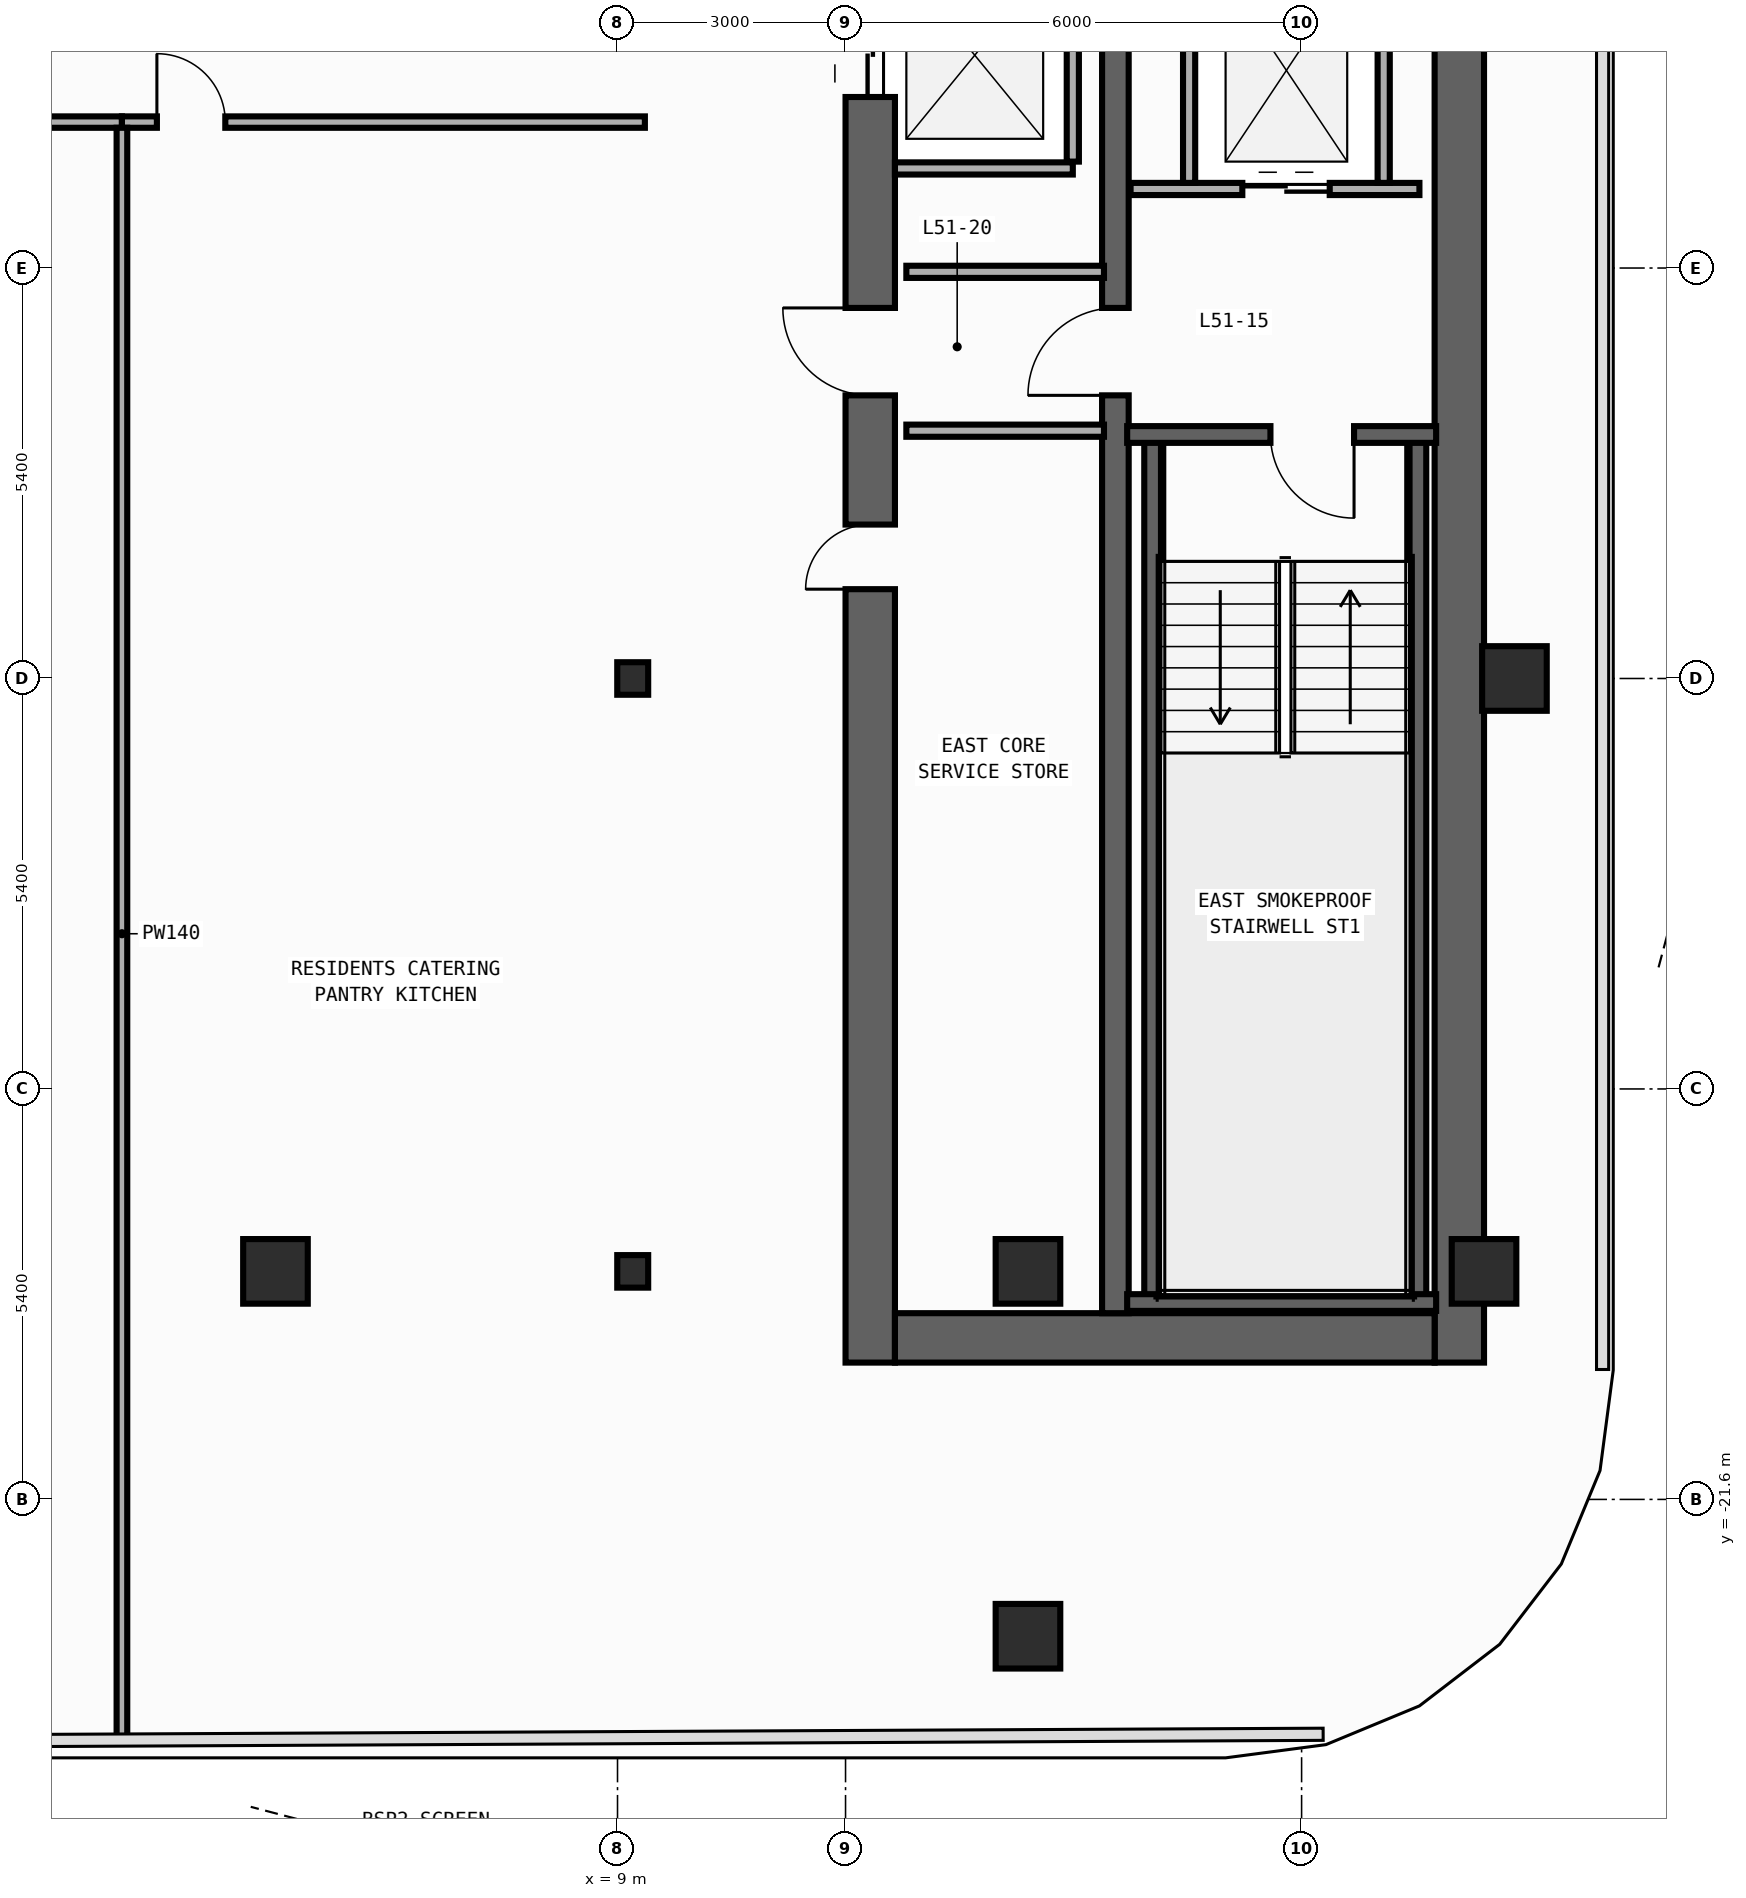
"""IFC4 building model, lengths in metres.
Left out: names, types, materials, properties, quantities, classifications, styles, units other than length and angle.
Written with IfcOpenShell. Run it as: python <this file> out.ifc"""

import sys

from ifc_helpers import new_model, si_unit, direction, frame, frame_2d, origin, origin_2d, place, context, subcontext, project, spatial, rectangle, i_section, extrude, element, fill, save


model = new_model("IFC4")
c1 = context("Model", 3, precision=1e-05, world=origin(), true_north=direction((0.0, 1.0)))
c2 = subcontext(c1, "Body", "Model", "MODEL_VIEW")
j1 = project(units=[si_unit("LENGTHUNIT", "METRE"), si_unit("PLANEANGLEUNIT", "RADIAN")], contexts=[c1])
p1 = place(None, origin())
s1 = spatial("IfcSite", under=j1, at=p1, CompositionType="ELEMENT")
p2 = place(p1, origin())
s2 = spatial("IfcBuilding", under=s1, at=p2, CompositionType="ELEMENT")
p3 = place(p2, frame((0.0, 0.0, 222.4)))
s3 = spatial("IfcBuildingStorey", under=s2, at=p3, CompositionType="ELEMENT", Elevation=222.4)
p4 = place(p3, frame((12.325, -19.8, 0.0), z_axis=(0.0, 0.0, 1.0), x_axis=(0.0, 1.0, 0.0)))
e1 = element("IfcWall", 1, at=p4, inside=s3, PredefinedType="SHEAR", context=c2, shape_type="SweptSolid", body=[
    extrude(rectangle(XDim=27.0, YDim=0.65, at=frame_2d((13.5, 0.0))), origin(), (0.0, 0.0, 1.0), 3.34),
])
p5 = place(p4, frame((23.05, 0.0, 0.0)))
e2 = element("IfcOpeningElement", 2, at=p5, cuts=e1, PredefinedType="OPENING", context=c2, shape_type="SweptSolid", body=[
    extrude(rectangle(XDim=1.1, YDim=2.2, at=frame_2d((0.55, 1.1))), frame((0.0, 0.335, 0.0), z_axis=(0.0, -1.0, 0.0), x_axis=(1.0, 0.0, 0.0)), (0.0, 0.0, 1.0), 0.67),
])
p6 = place(p4, frame((19.85, 0.0, 0.0)))
e3 = element("IfcOpeningElement", 3, at=p6, cuts=e1, PredefinedType="OPENING", context=c2, shape_type="SweptSolid", body=[
    extrude(rectangle(XDim=1.1, YDim=2.2, at=frame_2d((0.55, 1.1))), frame((0.0, 0.335, 0.0), z_axis=(0.0, -1.0, 0.0), x_axis=(1.0, 0.0, 0.0)), (0.0, 0.0, 1.0), 0.67),
])
p7 = place(p4, frame((16.65, 0.0, 0.0)))
e4 = element("IfcOpeningElement", 4, at=p7, cuts=e1, PredefinedType="OPENING", context=c2, shape_type="SweptSolid", body=[
    extrude(rectangle(XDim=1.1, YDim=2.2, at=frame_2d((0.55, 1.1))), frame((0.0, 0.335, 0.0), z_axis=(0.0, -1.0, 0.0), x_axis=(1.0, 0.0, 0.0)), (0.0, 0.0, 1.0), 0.67),
])
p8 = place(p4, frame((10.175, 0.0, 0.0)))
e5 = element("IfcOpeningElement", 5, at=p8, cuts=e1, PredefinedType="OPENING", context=c2, shape_type="SweptSolid", body=[
    extrude(rectangle(XDim=0.85, YDim=2.1, at=frame_2d((0.425, 1.05))), frame((0.0, 0.335, 0.0), z_axis=(0.0, -1.0, 0.0), x_axis=(1.0, 0.0, 0.0)), (0.0, 0.0, 1.0), 0.67),
])
p9 = place(p4, frame((12.725, 0.0, 0.0)))
e6 = element("IfcOpeningElement", 6, at=p9, cuts=e1, PredefinedType="OPENING", context=c2, shape_type="SweptSolid", body=[
    extrude(rectangle(XDim=1.15, YDim=2.2, at=frame_2d((0.575, 1.1))), frame((0.0, 0.335, 0.0), z_axis=(0.0, -1.0, 0.0), x_axis=(1.0, 0.0, 0.0)), (0.0, 0.0, 1.0), 0.67),
])
p10 = place(p4, frame((25.125, 0.0, 0.0)))
e7 = element("IfcOpeningElement", 7, at=p10, cuts=e1, PredefinedType="OPENING", context=c2, shape_type="SweptSolid", body=[
    extrude(rectangle(XDim=0.85, YDim=2.1, at=frame_2d((0.425, 1.05))), frame((0.0, 0.335, 0.0), z_axis=(0.0, -1.0, 0.0), x_axis=(1.0, 0.0, 0.0)), (0.0, 0.0, 1.0), 0.67),
])
p11 = place(p3, frame((20.075, -19.8, 0.0), z_axis=(0.0, 0.0, 1.0), x_axis=(0.0, 1.0, 0.0)))
e8 = element("IfcWall", 8, at=p11, inside=s3, PredefinedType="SHEAR", context=c2, shape_type="SweptSolid", body=[
    extrude(rectangle(XDim=27.0, YDim=0.65, at=frame_2d((13.5, 0.0))), origin(), (0.0, 0.0, 1.0), 3.34),
])
p12 = place(p3, frame((12.65, -19.475, 0.0), z_axis=(0.0, 0.0, 1.0), x_axis=(1.0, 0.0, 0.0)))
e9 = element("IfcWall", 9, at=p12, inside=s3, PredefinedType="SHEAR", context=c2, shape_type="SweptSolid", body=[
    extrude(rectangle(XDim=7.1, YDim=0.65, at=frame_2d((3.55, 0.0))), origin(), (0.0, 0.0, 1.0), 3.34),
])
p13 = place(p3, frame((15.55, -19.15, 0.0), z_axis=(0.0, 0.0, 1.0), x_axis=(0.0, 1.0, 0.0)))
e10 = element("IfcWall", 10, at=p13, inside=s3, PredefinedType="SHEAR", context=c2, shape_type="SweptSolid", body=[
    extrude(rectangle(XDim=25.7, YDim=0.35, at=frame_2d((12.85, 0.0))), origin(), (0.0, 0.0, 1.0), 3.34),
])
p14 = place(p13, frame((12.075, 0.0, 0.0)))
e11 = element("IfcOpeningElement", 11, at=p14, cuts=e10, PredefinedType="OPENING", context=c2, shape_type="SweptSolid", body=[
    extrude(rectangle(XDim=1.15, YDim=2.2, at=frame_2d((0.575, 1.1))), frame((0.0, 0.185, 0.0), z_axis=(0.0, -1.0, 0.0), x_axis=(1.0, 0.0, 0.0)), (0.0, 0.0, 1.0), 0.37),
])
p15 = place(p13, frame((24.475, 0.0, 0.0)))
e12 = element("IfcOpeningElement", 12, at=p15, cuts=e10, PredefinedType="OPENING", context=c2, shape_type="SweptSolid", body=[
    extrude(rectangle(XDim=0.85, YDim=2.1, at=frame_2d((0.425, 1.05))), frame((0.0, 0.185, 0.0), z_axis=(0.0, -1.0, 0.0), x_axis=(1.0, 0.0, 0.0)), (0.0, 0.0, 1.0), 0.37),
])
for number, where, z_axis, x_axis in (
    (13, (16.04, -19.01, 0.0), (0.0, 0.0, 1.0), (0.0, 1.0, 0.0)),
    (14, (19.53, -19.01, 0.0), (0.0, 0.0, 1.0), (0.0, 1.0, 0.0)),
):
    element("IfcWall", number, at=place(p3, frame(where, z_axis=z_axis, x_axis=x_axis)), inside=s3, PredefinedType="SHEAR", context=c2, shape_type="SweptSolid", body=[
        extrude(rectangle(XDim=11.42, YDim=0.22, at=frame_2d((5.71, 0.0))), origin(), (0.0, 0.0, 1.0), 3.34),
    ])
p16 = place(p3, frame((15.705, -19.01, 0.0), z_axis=(0.0, 0.0, 1.0), x_axis=(1.0, 0.0, 0.0)))
e15 = element("IfcWall", 15, at=p16, inside=s3, PredefinedType="SHEAR", context=c2, shape_type="SweptSolid", body=[
    extrude(rectangle(XDim=4.065, YDim=0.22, at=frame_2d((2.032, 0.0))), origin(), (0.0, 0.0, 1.0), 3.34),
])
p17 = place(p3, frame((19.77, -7.59, 0.0), z_axis=(0.0, 0.0, 1.0), x_axis=(-1.0, 0.0, 0.0)))
e16 = element("IfcWall", 16, at=p17, inside=s3, PredefinedType="SHEAR", context=c2, shape_type="SweptSolid", body=[
    extrude(rectangle(XDim=4.065, YDim=0.22, at=frame_2d((2.032, 0.0))), origin(), (0.0, 0.0, 1.0), 3.34),
])
p18 = place(p17, frame((1.08, 0.0, 0.0)))
e17 = element("IfcOpeningElement", 17, at=p18, cuts=e16, PredefinedType="OPENING", context=c2, shape_type="SweptSolid", body=[
    extrude(rectangle(XDim=1.1, YDim=2.2, at=frame_2d((0.55, 1.1))), frame((0.0, 0.12, 0.0), z_axis=(0.0, -1.0, 0.0), x_axis=(1.0, 0.0, 0.0)), (0.0, 0.0, 1.0), 0.24),
])
for number, where, z_axis, x_axis in (
    (18, (9.2, -18.6, 0.0), (0.0, 0.0, 1.0), (1.0, 0.0, 0.0)),
    (19, (9.2, -10.8, 0.0), (0.0, 0.0, 1.0), (1.0, 0.0, 0.0)),
):
    element("IfcColumn", number, at=place(p3, frame(where, z_axis=z_axis, x_axis=x_axis)), inside=s3, PredefinedType="COLUMN", context=c2, shape_type="SweptSolid", body=[
        extrude(i_section(OverallWidth=0.407, OverallDepth=0.428, WebThickness=0.02, FlangeThickness=0.035, FilletRadius=0.022, at=origin_2d()), origin(), (0.0, 0.0, 1.0), 3.6),
    ])
for number, where, z_axis, x_axis in (
    (20, (20.4, -18.6, 0.0), (0.0, 0.0, 1.0), (1.0, 0.0, 0.0)),
    (21, (14.4, -18.6, 0.0), (0.0, 0.0, 1.0), (1.0, 0.0, 0.0)),
    (22, (4.5, -18.6, 0.0), (0.0, 0.0, 1.0), (1.0, 0.0, 0.0)),
    (23, (20.8, -10.8, 0.0), (0.0, 0.0, 1.0), (1.0, 0.0, 0.0)),
    (24, (14.4, -23.4, 0.0), (0.0, 0.0, 1.0), (1.0, 0.0, 0.0)),
):
    element("IfcColumn", number, at=place(p3, frame(where, z_axis=z_axis, x_axis=x_axis)), inside=s3, PredefinedType="COLUMN", context=c2, shape_type="SweptSolid", body=[
        extrude(rectangle(XDim=0.85, YDim=0.85, at=origin_2d()), origin(), (0.0, 0.0, 1.0), 3.6),
    ])
p19 = place(p3, frame((12.65, -4.09, 0.0), z_axis=(0.0, 0.0, 1.0), x_axis=(1.0, 0.0, 0.0)))
e25 = element("IfcWall", 25, at=p19, inside=s3, PredefinedType="STANDARD", context=c2, shape_type="SweptSolid", body=[
    extrude(rectangle(XDim=2.34, YDim=0.16, at=frame_2d((1.17, 0.0))), origin(), (0.0, 0.0, 1.0), 3.34),
])
p20 = place(p3, frame((14.99, -4.0, 0.0), z_axis=(0.0, 0.0, 1.0), x_axis=(0.0, 1.0, 0.0)))
e26 = element("IfcWall", 26, at=p20, inside=s3, PredefinedType="STANDARD", context=c2, shape_type="SweptSolid", body=[
    extrude(rectangle(XDim=2.8, YDim=0.16, at=frame_2d((1.4, 0.0))), origin(), (0.0, 0.0, 1.0), 3.34),
])
p21 = place(p3, frame((15.75, -4.36, 0.0), z_axis=(0.0, 0.0, 1.0), x_axis=(1.0, 0.0, 0.0)))
e27 = element("IfcWall", 27, at=p21, inside=s3, PredefinedType="STANDARD", context=c2, shape_type="SweptSolid", body=[
    extrude(rectangle(XDim=3.8, YDim=0.16, at=frame_2d((1.9, 0.0))), origin(), (0.0, 0.0, 1.0), 3.34),
])
p22 = place(p21, frame((1.47, 0.0, 0.0)))
e28 = element("IfcOpeningElement", 28, at=p22, cuts=e27, PredefinedType="OPENING", context=c2, shape_type="SweptSolid", body=[
    extrude(rectangle(XDim=1.15, YDim=2.2, at=frame_2d((0.575, 1.1))), frame((0.0, 0.09, 0.0), z_axis=(0.0, -1.0, 0.0), x_axis=(1.0, 0.0, 0.0)), (0.0, 0.0, 1.0), 0.18),
])
for number, where, z_axis, x_axis in (
    (29, (16.52, -4.28, 0.0), (0.0, 0.0, 1.0), (0.0, 1.0, 0.0)),
    (30, (19.08, -4.28, 0.0), (0.0, 0.0, 1.0), (0.0, 1.0, 0.0)),
):
    element("IfcWall", number, at=place(p3, frame(where, z_axis=z_axis, x_axis=x_axis)), inside=s3, PredefinedType="STANDARD", context=c2, shape_type="SweptSolid", body=[
        extrude(rectangle(XDim=2.98, YDim=0.16, at=frame_2d((1.49, 0.0))), origin(), (0.0, 0.0, 1.0), 3.34),
    ])
for number, where, z_axis, x_axis in (
    (31, (12.8, -5.45, 0.0), (0.0, 0.0, 1.0), (1.0, 0.0, 0.0)),
    (32, (12.8, -7.54, 0.0), (0.0, 0.0, 1.0), (1.0, 0.0, 0.0)),
):
    element("IfcWall", number, at=place(p3, frame(where, z_axis=z_axis, x_axis=x_axis)), inside=s3, PredefinedType="STANDARD", context=c2, shape_type="SweptSolid", body=[
        extrude(rectangle(XDim=2.6, YDim=0.16, at=frame_2d((1.3, 0.0))), origin(), (0.0, 0.0, 1.0), 3.34),
    ])
p23 = place(p3, frame((-9.36, -3.48, 0.0), z_axis=(0.0, 0.0, 1.0), x_axis=(1.0, 0.0, 0.0)))
e33 = element("IfcWall", 33, at=p23, inside=s3, PredefinedType="PARTITIONING", context=c2, shape_type="SweptSolid", body=[
    extrude(rectangle(XDim=11.84, YDim=0.15, at=frame_2d((5.92, 0.0))), origin(), (0.0, 0.0, 1.0), 3.34),
])
p24 = place(p23, frame((8.877, 0.0, 0.0)))
e34 = element("IfcOpeningElement", 34, at=p24, cuts=e33, PredefinedType="OPENING", context=c2, shape_type="SweptSolid", body=[
    extrude(rectangle(XDim=0.9, YDim=2.15, at=frame_2d((0.45, 1.075))), frame((0.0, 0.085, 0.0), z_axis=(0.0, -1.0, 0.0), x_axis=(1.0, 0.0, 0.0)), (0.0, 0.0, 1.0), 0.17),
])
p25 = place(p3, frame((2.48, -3.48, 0.0), z_axis=(0.0, 0.0, 1.0), x_axis=(1.0, 0.0, 0.0)))
e35 = element("IfcWall", 35, at=p25, inside=s3, PredefinedType="PARTITIONING", context=c2, shape_type="SweptSolid", body=[
    extrude(rectangle(XDim=6.88, YDim=0.15, at=frame_2d((3.44, 0.0))), origin(), (0.0, 0.0, 1.0), 3.34),
])
p26 = place(p25, frame((0.46, 0.0, 0.0)))
e36 = element("IfcOpeningElement", 36, at=p26, cuts=e35, PredefinedType="OPENING", context=c2, shape_type="SweptSolid", body=[
    extrude(rectangle(XDim=0.9, YDim=2.15, at=frame_2d((0.45, 1.075))), frame((0.0, 0.085, 0.0), z_axis=(0.0, -1.0, 0.0), x_axis=(1.0, 0.0, 0.0)), (0.0, 0.0, 1.0), 0.17),
])
p27 = place(p3, frame((2.48, -24.761, 0.0), z_axis=(0.0, 0.0, 1.0), x_axis=(0.0, 1.0, 0.0)))
e37 = element("IfcWall", 37, at=p27, inside=s3, PredefinedType="PARTITIONING", context=c2, shape_type="SweptSolid", body=[
    extrude(rectangle(XDim=21.206, YDim=0.14, at=frame_2d((10.603, 0.0))), origin(), (0.0, 0.0, 1.0), 3.34),
])
p28 = place(p18, origin())
e38 = element("IfcDoor", 38, at=p28, inside=s3, OperationType="SINGLE_SWING_LEFT", PredefinedType="DOOR", context=c2, shape_type="SweptSolid", body=[
    extrude(rectangle(XDim=1.1, YDim=2.2, at=frame_2d((0.55, 1.1))), frame((0.0, 0.025, 0.0), z_axis=(0.0, -1.0, 0.0), x_axis=(1.0, 0.0, 0.0)), (0.0, 0.0, 1.0), 0.05),
])
fill(e17, e38)
p29 = place(p7, origin())
e39 = element("IfcDoor", 39, at=p29, inside=s3, OperationType="DOUBLE_DOOR_SLIDING", PredefinedType="DOOR", context=c2, shape_type="SweptSolid", body=[
    extrude(rectangle(XDim=1.1, YDim=2.2, at=frame_2d((0.55, 1.1))), frame((0.0, 0.025, 0.0), z_axis=(0.0, -1.0, 0.0), x_axis=(1.0, 0.0, 0.0)), (0.0, 0.0, 1.0), 0.05),
])
fill(e4, e39)
p30 = place(p8, origin())
e40 = element("IfcDoor", 40, at=p30, inside=s3, OperationType="SINGLE_SWING_LEFT", PredefinedType="DOOR", context=c2, shape_type="SweptSolid", body=[
    extrude(rectangle(XDim=0.85, YDim=2.1, at=frame_2d((0.425, 1.05))), frame((0.0, 0.025, 0.0), z_axis=(0.0, -1.0, 0.0), x_axis=(1.0, 0.0, 0.0)), (0.0, 0.0, 1.0), 0.05),
])
fill(e5, e40)
p31 = place(p9, origin())
e41 = element("IfcDoor", 41, at=p31, inside=s3, OperationType="SINGLE_SWING_RIGHT", PredefinedType="DOOR", context=c2, shape_type="SweptSolid", body=[
    extrude(rectangle(XDim=1.15, YDim=2.2, at=frame_2d((0.575, 1.1))), frame((0.0, 0.025, 0.0), z_axis=(0.0, -1.0, 0.0), x_axis=(1.0, 0.0, 0.0)), (0.0, 0.0, 1.0), 0.05),
])
fill(e6, e41)
p32 = place(p14, origin())
e42 = element("IfcDoor", 42, at=p32, inside=s3, OperationType="SINGLE_SWING_LEFT", PredefinedType="DOOR", context=c2, shape_type="SweptSolid", body=[
    extrude(rectangle(XDim=1.15, YDim=2.2, at=frame_2d((0.575, 1.1))), frame((0.0, 0.025, 0.0), z_axis=(0.0, -1.0, 0.0), x_axis=(1.0, 0.0, 0.0)), (0.0, 0.0, 1.0), 0.05),
])
fill(e11, e42)
p33 = place(p22, origin())
e43 = element("IfcDoor", 43, at=p33, inside=s3, OperationType="DOUBLE_DOOR_SLIDING", PredefinedType="DOOR", context=c2, shape_type="SweptSolid", body=[
    extrude(rectangle(XDim=1.15, YDim=2.2, at=frame_2d((0.575, 1.1))), frame((0.0, 0.025, 0.0), z_axis=(0.0, -1.0, 0.0), x_axis=(1.0, 0.0, 0.0)), (0.0, 0.0, 1.0), 0.05),
])
fill(e28, e43)
p34 = place(p26, origin())
e44 = element("IfcDoor", 44, at=p34, inside=s3, OperationType="SINGLE_SWING_LEFT", PredefinedType="DOOR", context=c2, shape_type="SweptSolid", body=[
    extrude(rectangle(XDim=0.9, YDim=2.15, at=frame_2d((0.45, 1.075))), frame((0.0, 0.025, 0.0), z_axis=(0.0, -1.0, 0.0), x_axis=(1.0, 0.0, 0.0)), (0.0, 0.0, 1.0), 0.05),
])
fill(e36, e44)
save(model, sys.argv[1])
